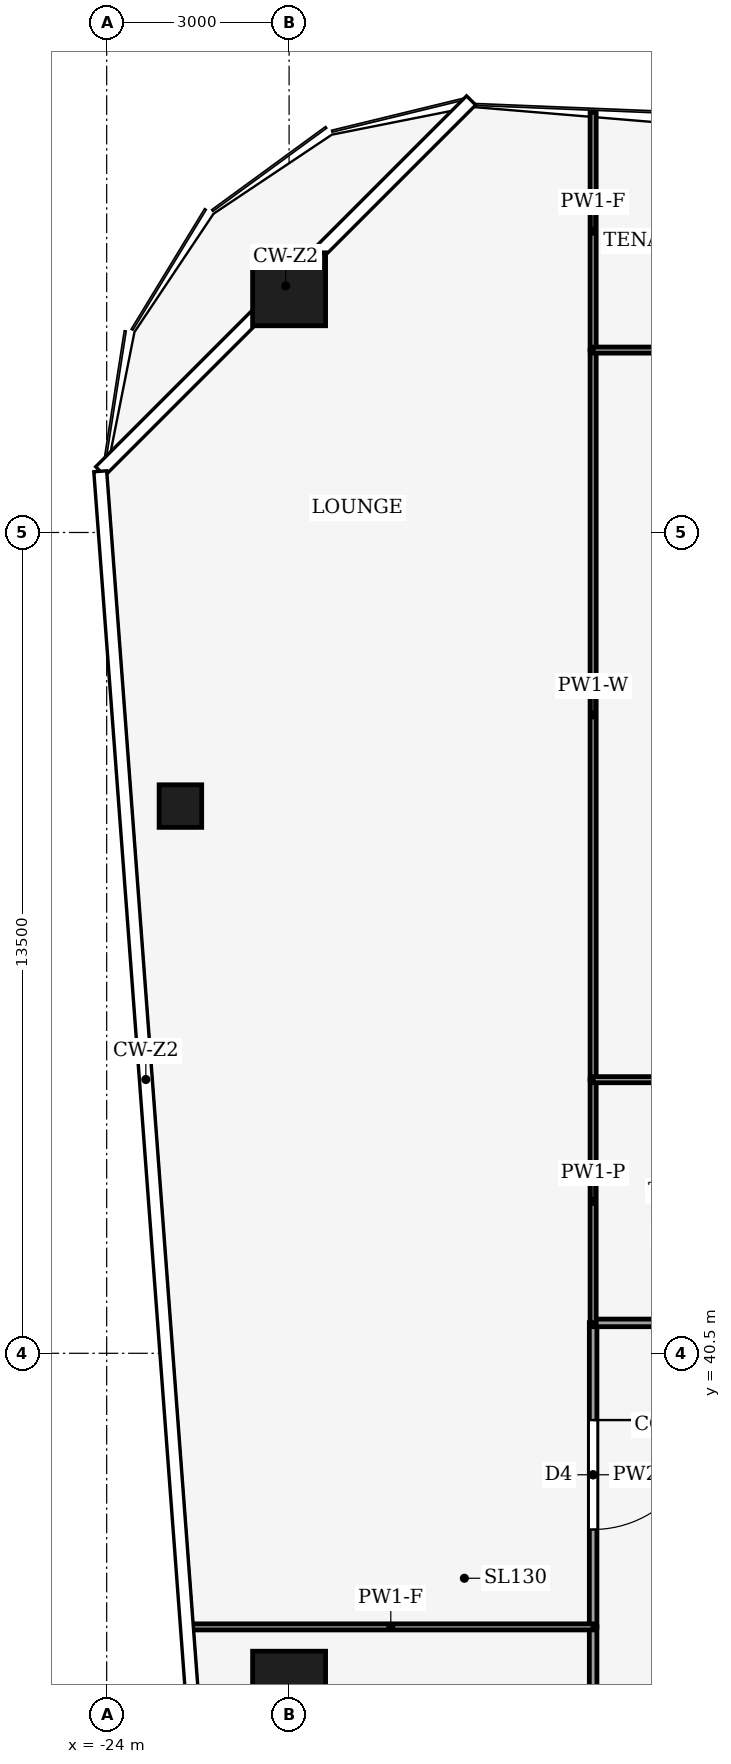
"""IFC4 building model, lengths in metres.
Left out: names, types, materials, properties, quantities, classifications, styles, units other than length and angle.
Written with IfcOpenShell. Run it as: python <this file> out.ifc"""

import sys

from ifc_helpers import new_model, si_unit, direction, frame, frame_2d, origin, origin_2d, place, context, subcontext, project, spatial, rectangle, hollow_rectangle, extrude, element, fill, save


model = new_model("IFC4")
c1 = context("Model", 3, precision=1e-05, world=origin(), true_north=direction((0.0, 1.0)))
c2 = subcontext(c1, "Body", "Model", "MODEL_VIEW")
j1 = project(units=[si_unit("LENGTHUNIT", "METRE"), si_unit("PLANEANGLEUNIT", "RADIAN")], contexts=[c1])
p1 = place(None, origin())
s1 = spatial("IfcSite", under=j1, at=p1, CompositionType="ELEMENT")
p2 = place(p1, origin())
s2 = spatial("IfcBuilding", under=s1, at=p2, CompositionType="ELEMENT")
p3 = place(p2, frame((0.0, 0.0, 154.0)))
s3 = spatial("IfcBuildingStorey", under=s2, at=p3, CompositionType="ELEMENT", Elevation=154.0)
for number, where, z_axis, x_axis in (
    (1, (-21.0, 58.0, 0.0), (0.0, 0.0, 1.0), (1.0, 0.0, 0.0)),
    (2, (-21.0, 35.0, 0.0), (0.0, 0.0, 1.0), (1.0, 0.0, 0.0)),
):
    element("IfcColumn", number, at=place(p3, frame(where, z_axis=z_axis, x_axis=x_axis)), inside=s3, PredefinedType="COLUMN", context=c2, shape_type="SweptSolid", body=[
        extrude(hollow_rectangle(XDim=1.2, YDim=1.2, WallThickness=0.07, at=origin_2d()), origin(), (0.0, 0.0, 1.0), 4.0),
    ])
p4 = place(p3, frame((-22.788, 49.5, 0.0), z_axis=(0.0, 0.0, 1.0), x_axis=(1.0, 0.0, 0.0)))
e3 = element("IfcColumn", 3, at=p4, inside=s3, PredefinedType="COLUMN", context=c2, shape_type="SweptSolid", body=[
    extrude(hollow_rectangle(XDim=0.7, YDim=0.7, WallThickness=0.03, at=origin_2d()), origin(), (0.0, 0.0, 1.0), 4.0),
])
p5 = place(p3, frame((-16.0, 27.0, 0.0), z_axis=(0.0, 0.0, 1.0), x_axis=(0.0, 1.0, 0.0)))
e4 = element("IfcWall", 4, at=p5, inside=s3, PredefinedType="PARTITIONING", context=c2, shape_type="SweptSolid", body=[
    extrude(rectangle(XDim=9.0, YDim=0.125, at=frame_2d((4.5, 0.0))), origin(), (0.0, 0.0, 1.0), 3.48),
])
p6 = place(p5, frame((4.0, 0.0, 0.0)))
e5 = element("IfcOpeningElement", 5, at=p6, cuts=e4, PredefinedType="OPENING", context=c2, shape_type="SweptSolid", body=[
    extrude(rectangle(XDim=1.0, YDim=2.1, at=frame_2d((0.5, 1.05))), frame((0.0, 0.073, 0.0), z_axis=(0.0, -1.0, 0.0), x_axis=(1.0, 0.0, 0.0)), (0.0, 0.0, 1.0), 0.145),
])
p7 = place(p3, frame((-16.0, 41.004, 0.0), z_axis=(0.0, 0.0, 1.0), x_axis=(0.0, -1.0, 0.0)))
e6 = element("IfcWall", 6, at=p7, inside=s3, PredefinedType="PARTITIONING", context=c2, shape_type="SweptSolid", body=[
    extrude(rectangle(XDim=5.004, YDim=0.125, at=frame_2d((2.502, 0.0))), origin(), (0.0, 0.0, 1.0), 3.14),
])
p8 = place(p7, frame((1.602, 0.0, 0.0)))
e7 = element("IfcOpeningElement", 7, at=p8, cuts=e6, PredefinedType="OPENING", context=c2, shape_type="SweptSolid", body=[
    extrude(rectangle(XDim=1.8, YDim=2.1, at=frame_2d((0.9, 1.05))), frame((0.0, 0.073, 0.0), z_axis=(0.0, -1.0, 0.0), x_axis=(1.0, 0.0, 0.0)), (0.0, 0.0, 1.0), 0.145),
])
p9 = place(p3, frame((-16.0, 41.0, 0.0), z_axis=(0.0, 0.0, 1.0), x_axis=(1.0, 0.0, 0.0)))
e8 = element("IfcWall", 8, at=p9, inside=s3, PredefinedType="PARTITIONING", context=c2, shape_type="SweptSolid", body=[
    extrude(rectangle(XDim=4.0, YDim=0.125, at=frame_2d((2.0, 0.0))), origin(), (0.0, 0.0, 1.0), 3.44),
])
p10 = place(p9, frame((1.5, 0.0, 0.0)))
e9 = element("IfcOpeningElement", 9, at=p10, cuts=e8, PredefinedType="OPENING", context=c2, shape_type="SweptSolid", body=[
    extrude(rectangle(XDim=1.0, YDim=2.1, at=frame_2d((0.5, 1.05))), frame((0.0, 0.073, 0.0), z_axis=(0.0, -1.0, 0.0), x_axis=(1.0, 0.0, 0.0)), (0.0, 0.0, 1.0), 0.145),
])
p11 = place(p3, frame((-16.0, 36.0, 0.0), z_axis=(0.0, 0.0, 1.0), x_axis=(-1.0, 0.0, 0.0)))
e10 = element("IfcWall", 10, at=p11, inside=s3, PredefinedType="PARTITIONING", context=c2, shape_type="SweptSolid", body=[
    extrude(rectangle(XDim=6.655, YDim=0.1, at=frame_2d((3.328, 0.0))), origin(), (0.0, 0.0, 1.0), 3.04),
])
p12 = place(p3, frame((-16.0, 41.0, 0.0), z_axis=(0.0, 0.0, 1.0), x_axis=(0.0, 1.0, 0.0)))
e11 = element("IfcWall", 11, at=p12, inside=s3, PredefinedType="PARTITIONING", context=c2, shape_type="SweptSolid", body=[
    extrude(rectangle(XDim=4.0, YDim=0.1, at=frame_2d((2.0, 0.0))), origin(), (0.0, 0.0, 1.0), 3.44),
])
p13 = place(p3, frame((-16.0, 45.0, 0.0), z_axis=(0.0, 0.0, 1.0), x_axis=(0.0, 1.0, 0.0)))
e12 = element("IfcWall", 12, at=p13, inside=s3, PredefinedType="PARTITIONING", context=c2, shape_type="SweptSolid", body=[
    extrude(rectangle(XDim=12.0, YDim=0.1, at=frame_2d((6.0, 0.0))), origin(), (0.0, 0.0, 1.0), 3.24),
])
p14 = place(p3, frame((-16.0, 57.0, 0.0), z_axis=(0.0, 0.0, 1.0), x_axis=(0.0, 1.0, 0.0)))
e13 = element("IfcWall", 13, at=p14, inside=s3, PredefinedType="PARTITIONING", context=c2, shape_type="SweptSolid", body=[
    extrude(rectangle(XDim=3.913, YDim=0.1, at=frame_2d((1.957, 0.0))), origin(), (0.0, 0.0, 1.0), 3.04),
])
p15 = place(p3, frame((-11.996, 45.0, 0.0), z_axis=(0.0, 0.0, 1.0), x_axis=(-1.0, 0.0, 0.0)))
e14 = element("IfcWall", 14, at=p15, inside=s3, PredefinedType="PARTITIONING", context=c2, shape_type="SweptSolid", body=[
    extrude(rectangle(XDim=4.004, YDim=0.1, at=frame_2d((2.002, 0.0))), origin(), (0.0, 0.0, 1.0), 3.87),
])
p16 = place(p3, frame((-16.0, 57.0, 0.0), z_axis=(0.0, 0.0, 1.0), x_axis=(1.0, 0.0, 0.0)))
e15 = element("IfcWall", 15, at=p16, inside=s3, PredefinedType="PARTITIONING", context=c2, shape_type="SweptSolid", body=[
    extrude(rectangle(XDim=13.0, YDim=0.1, at=frame_2d((6.5, 0.0))), origin(), (0.0, 0.0, 1.0), 3.44),
])
p17 = place(p16, frame((6.8, 0.0, 0.0)))
e16 = element("IfcOpeningElement", 16, at=p17, cuts=e15, PredefinedType="OPENING", context=c2, shape_type="SweptSolid", body=[
    extrude(rectangle(XDim=1.0, YDim=2.1, at=frame_2d((0.5, 1.05))), frame((0.0, 0.06, 0.0), z_axis=(0.0, -1.0, 0.0), x_axis=(1.0, 0.0, 0.0)), (0.0, 0.0, 1.0), 0.12),
])
p18 = place(p8, origin())
e17 = element("IfcDoor", 17, at=p18, inside=s3, OperationType="DOUBLE_DOOR_SINGLE_SWING", PredefinedType="DOOR", context=c2, shape_type="SweptSolid", body=[
    extrude(rectangle(XDim=1.8, YDim=2.1, at=frame_2d((0.9, 1.05))), frame((0.0, 0.025, 0.0), z_axis=(0.0, -1.0, 0.0), x_axis=(1.0, 0.0, 0.0)), (0.0, 0.0, 1.0), 0.05),
])
fill(e7, e17)
save(model, sys.argv[1])
